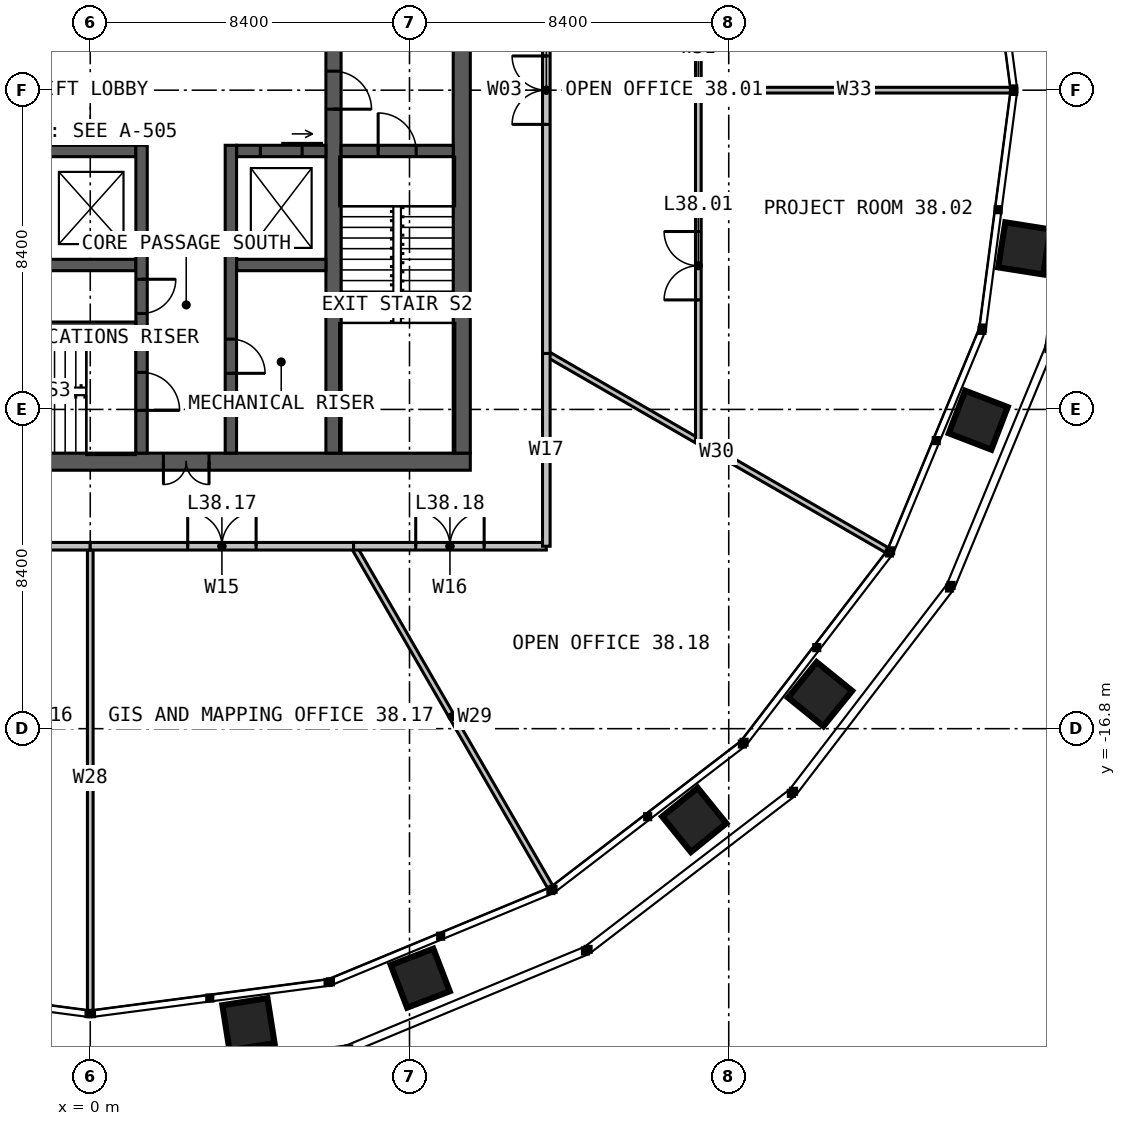
"""IFC4 building model, lengths in metres.
Left out: names, types, materials, properties, quantities, classifications, styles, units other than length and angle.
Written with IfcOpenShell. Run it as: python <this file> out.ifc"""

import sys

from ifc_helpers import new_model, si_unit, direction, frame, frame_2d, origin, place, context, subcontext, project, spatial, rectangle, extrude, element, fill, save


model = new_model("IFC4")
c1 = context("Model", 3, precision=1e-05, world=origin(), true_north=direction((0.0, 1.0)))
c2 = subcontext(c1, "Body", "Model", "MODEL_VIEW")
j1 = project(units=[si_unit("LENGTHUNIT", "METRE"), si_unit("PLANEANGLEUNIT", "RADIAN")], contexts=[c1])
p1 = place(None, origin())
s1 = spatial("IfcSite", under=j1, at=p1, CompositionType="ELEMENT")
p2 = place(p1, origin())
s2 = spatial("IfcBuilding", under=s1, at=p2, CompositionType="ELEMENT")
p3 = place(p2, frame((0.0, 0.0, 159.0)))
s3 = spatial("IfcBuildingStorey", under=s2, at=p3, CompositionType="ELEMENT", Elevation=159.0)
p4 = place(p3, frame((10.0, -9.775, 0.0), z_axis=(0.0, 0.0, 1.0), x_axis=(-1.0, 0.0, 0.0)))
e1 = element("IfcWall", 1, at=p4, inside=s3, PredefinedType="SOLIDWALL", context=c2, shape_type="SweptSolid", body=[
    extrude(rectangle(XDim=20.0, YDim=0.45, at=frame_2d((10.0, 0.0))), origin(), (0.0, 0.0, 1.0), 4.0),
])
p5 = place(p4, frame((6.875, 0.0, 0.0)))
e2 = element("IfcOpeningElement", 2, at=p5, cuts=e1, PredefinedType="OPENING", context=c2, shape_type="SweptSolid", body=[
    extrude(rectangle(XDim=1.2, YDim=2.2, at=frame_2d((0.6, 1.1))), frame((0.0, 0.235, 0.0), z_axis=(0.0, -1.0, 0.0), x_axis=(1.0, 0.0, 0.0)), (0.0, 0.0, 1.0), 0.47),
])
p6 = place(p3, frame((9.775, -9.55, 0.0), z_axis=(0.0, 0.0, 1.0), x_axis=(0.0, 1.0, 0.0)))
e3 = element("IfcWall", 3, at=p6, inside=s3, PredefinedType="SOLIDWALL", context=c2, shape_type="SweptSolid", body=[
    extrude(rectangle(XDim=19.1, YDim=0.45, at=frame_2d((9.55, 0.0))), origin(), (0.0, 0.0, 1.0), 4.0),
])
p7 = place(p3, frame((6.4, 9.55, 0.0), z_axis=(0.0, 0.0, 1.0), x_axis=(0.0, -1.0, 0.0)))
e4 = element("IfcWall", 4, at=p7, inside=s3, PredefinedType="SOLIDWALL", context=c2, shape_type="SweptSolid", body=[
    extrude(rectangle(XDim=19.1, YDim=0.4, at=frame_2d((9.55, 0.0))), origin(), (0.0, 0.0, 1.0), 4.0),
])
p8 = place(p7, frame((9.05, 0.0, 0.0)))
e5 = element("IfcOpeningElement", 5, at=p8, cuts=e4, PredefinedType="OPENING", context=c2, shape_type="SweptSolid", body=[
    extrude(rectangle(XDim=1.0, YDim=2.2, at=frame_2d((0.5, 1.1))), frame((0.0, 0.21, 0.0), z_axis=(0.0, -1.0, 0.0), x_axis=(1.0, 0.0, 0.0)), (0.0, 0.0, 1.0), 0.42),
])
p9 = place(p3, frame((-6.2, -1.6, 0.0), z_axis=(0.0, 0.0, 1.0), x_axis=(1.0, 0.0, 0.0)))
e6 = element("IfcWall", 6, at=p9, inside=s3, PredefinedType="SOLIDWALL", context=c2, shape_type="SweptSolid", body=[
    extrude(rectangle(XDim=7.4, YDim=0.3, at=frame_2d((3.7, 0.0))), origin(), (0.0, 0.0, 1.0), 4.0),
])
p10 = place(p3, frame((3.85, -1.6, 0.0), z_axis=(0.0, 0.0, 1.0), x_axis=(1.0, 0.0, 0.0)))
e7 = element("IfcWall", 7, at=p10, inside=s3, PredefinedType="SOLIDWALL", context=c2, shape_type="SweptSolid", body=[
    extrude(rectangle(XDim=2.35, YDim=0.3, at=frame_2d((1.175, 0.0))), origin(), (0.0, 0.0, 1.0), 4.0),
])
p11 = place(p10, frame((0.625, 0.0, 0.0)))
e8 = element("IfcOpeningElement", 8, at=p11, cuts=e7, PredefinedType="OPENING", context=c2, shape_type="SweptSolid", body=[
    extrude(rectangle(XDim=1.1, YDim=2.2, at=frame_2d((0.55, 1.1))), frame((0.0, 0.16, 0.0), z_axis=(0.0, -1.0, 0.0), x_axis=(1.0, 0.0, 0.0)), (0.0, 0.0, 1.0), 0.32),
])
p12 = place(p3, frame((-6.2, -4.6, 0.0), z_axis=(0.0, 0.0, 1.0), x_axis=(1.0, 0.0, 0.0)))
e9 = element("IfcWall", 9, at=p12, inside=s3, PredefinedType="SOLIDWALL", context=c2, shape_type="SweptSolid", body=[
    extrude(rectangle(XDim=7.4, YDim=0.3, at=frame_2d((3.7, 0.0))), origin(), (0.0, 0.0, 1.0), 4.0),
])
p13 = place(p3, frame((3.85, -4.6, 0.0), z_axis=(0.0, 0.0, 1.0), x_axis=(1.0, 0.0, 0.0)))
e10 = element("IfcWall", 10, at=p13, inside=s3, PredefinedType="SOLIDWALL", context=c2, shape_type="SweptSolid", body=[
    extrude(rectangle(XDim=2.35, YDim=0.3, at=frame_2d((1.175, 0.0))), origin(), (0.0, 0.0, 1.0), 4.0),
])
p14 = place(p3, frame((1.35, -1.45, 0.0), z_axis=(0.0, 0.0, 1.0), x_axis=(0.0, -1.0, 0.0)))
e11 = element("IfcWall", 11, at=p14, inside=s3, PredefinedType="SOLIDWALL", context=c2, shape_type="SweptSolid", body=[
    extrude(rectangle(XDim=8.1, YDim=0.3, at=frame_2d((4.05, 0.0))), origin(), (0.0, 0.0, 1.0), 4.0),
])
p15 = place(p14, frame((5.975, 0.0, 0.0)))
e12 = element("IfcOpeningElement", 12, at=p15, cuts=e11, PredefinedType="OPENING", context=c2, shape_type="SweptSolid", body=[
    extrude(rectangle(XDim=1.0, YDim=2.2, at=frame_2d((0.5, 1.1))), frame((0.0, 0.16, 0.0), z_axis=(0.0, -1.0, 0.0), x_axis=(1.0, 0.0, 0.0)), (0.0, 0.0, 1.0), 0.32),
])
p16 = place(p14, frame((3.525, 0.0, 0.0)))
e13 = element("IfcOpeningElement", 13, at=p16, cuts=e11, PredefinedType="OPENING", context=c2, shape_type="SweptSolid", body=[
    extrude(rectangle(XDim=0.9, YDim=2.2, at=frame_2d((0.45, 1.1))), frame((0.0, 0.16, 0.0), z_axis=(0.0, -1.0, 0.0), x_axis=(1.0, 0.0, 0.0)), (0.0, 0.0, 1.0), 0.32),
])
p17 = place(p3, frame((3.7, -1.45, 0.0), z_axis=(0.0, 0.0, 1.0), x_axis=(0.0, -1.0, 0.0)))
e14 = element("IfcWall", 14, at=p17, inside=s3, PredefinedType="SOLIDWALL", context=c2, shape_type="SweptSolid", body=[
    extrude(rectangle(XDim=8.1, YDim=0.3, at=frame_2d((4.05, 0.0))), origin(), (0.0, 0.0, 1.0), 4.0),
])
p18 = place(p17, frame((5.1, 0.0, 0.0)))
e15 = element("IfcOpeningElement", 15, at=p18, cuts=e14, PredefinedType="OPENING", context=c2, shape_type="SweptSolid", body=[
    extrude(rectangle(XDim=0.9, YDim=2.2, at=frame_2d((0.45, 1.1))), frame((0.0, 0.16, 0.0), z_axis=(0.0, -1.0, 0.0), x_axis=(1.0, 0.0, 0.0)), (0.0, 0.0, 1.0), 0.32),
])
p19 = place(p3, frame((-6.2, -6.2, 0.0), z_axis=(0.0, 0.0, 1.0), x_axis=(1.0, 0.0, 0.0)))
e16 = element("IfcWall", 16, at=p19, inside=s3, PredefinedType="SOLIDWALL", context=c2, shape_type="SweptSolid", body=[
    extrude(rectangle(XDim=7.4, YDim=0.2, at=frame_2d((3.7, 0.0))), origin(), (0.0, 0.0, 1.0), 4.0),
])
p20 = place(p3, frame((6.6, -1.6, 0.0), z_axis=(0.0, 0.0, 1.0), x_axis=(1.0, 0.0, 0.0)))
e17 = element("IfcWall", 17, at=p20, inside=s3, PredefinedType="SOLIDWALL", context=c2, shape_type="SweptSolid", body=[
    extrude(rectangle(XDim=2.95, YDim=0.3, at=frame_2d((1.475, 0.0))), origin(), (0.0, 0.0, 1.0), 4.0),
])
p21 = place(p20, frame((0.975, 0.0, 0.0)))
e18 = element("IfcOpeningElement", 18, at=p21, cuts=e17, PredefinedType="OPENING", context=c2, shape_type="SweptSolid", body=[
    extrude(rectangle(XDim=1.0, YDim=2.2, at=frame_2d((0.5, 1.1))), frame((0.0, 0.16, 0.0), z_axis=(0.0, -1.0, 0.0), x_axis=(1.0, 0.0, 0.0)), (0.0, 0.0, 1.0), 0.32),
])
p22 = place(p3, frame((12.0, -6.928, 0.0), z_axis=(0.0, 0.0, 1.0), x_axis=(0.86602185845, -0.500006140648, 0.0)))
e19 = element("IfcWall", 19, at=p22, inside=s3, PredefinedType="PARTITIONING", context=c2, shape_type="SweptSolid", body=[
    extrude(rectangle(XDim=10.355, YDim=0.15, at=frame_2d((5.177, 0.0))), origin(), (0.0, 0.0, 1.0), 2.79),
])
p23 = place(p3, frame((0.0, -12.0, 0.0), z_axis=(0.0, 0.0, 1.0), x_axis=(0.0, -1.0, 0.0)))
e20 = element("IfcWall", 20, at=p23, inside=s3, PredefinedType="PARTITIONING", context=c2, shape_type="SweptSolid", body=[
    extrude(rectangle(XDim=12.211, YDim=0.15, at=frame_2d((6.105, 0.0))), origin(), (0.0, 0.0, 1.0), 2.79),
])
p24 = place(p3, frame((6.928, -12.0, 0.0), z_axis=(0.0, 0.0, 1.0), x_axis=(0.500006140648, -0.86602185845, 0.0)))
e21 = element("IfcWall", 21, at=p24, inside=s3, PredefinedType="PARTITIONING", context=c2, shape_type="SweptSolid", body=[
    extrude(rectangle(XDim=10.355, YDim=0.15, at=frame_2d((5.177, 0.0))), origin(), (0.0, 0.0, 1.0), 2.79),
])
p25 = place(p3, frame((16.0, -9.238, 0.0), z_axis=(0.0, 0.0, 1.0), x_axis=(0.0, 1.0, 0.0)))
e22 = element("IfcWall", 22, at=p25, inside=s3, PredefinedType="PARTITIONING", context=c2, shape_type="SweptSolid", body=[
    extrude(rectangle(XDim=18.475, YDim=0.15, at=frame_2d((9.238, 0.0))), origin(), (0.0, 0.0, 1.0), 2.79),
])
p26 = place(p25, frame((3.719, 0.0, 0.0)))
e23 = element("IfcOpeningElement", 23, at=p26, cuts=e22, PredefinedType="OPENING", context=c2, shape_type="SweptSolid", body=[
    extrude(rectangle(XDim=1.8, YDim=2.2, at=frame_2d((0.9, 1.1))), frame((0.0, 0.085, 0.0), z_axis=(0.0, -1.0, 0.0), x_axis=(1.0, 0.0, 0.0)), (0.0, 0.0, 1.0), 0.17),
])
p27 = place(p25, frame((12.956, 0.0, 0.0)))
e24 = element("IfcOpeningElement", 24, at=p27, cuts=e22, PredefinedType="OPENING", context=c2, shape_type="SweptSolid", body=[
    extrude(rectangle(XDim=1.8, YDim=2.2, at=frame_2d((0.9, 1.1))), frame((0.0, 0.085, 0.0), z_axis=(0.0, -1.0, 0.0), x_axis=(1.0, 0.0, 0.0)), (0.0, 0.0, 1.0), 0.17),
])
p28 = place(p3, frame((16.0, 0.0, 0.0), z_axis=(0.0, 0.0, 1.0), x_axis=(1.0, 0.0, 0.0)))
e25 = element("IfcWall", 25, at=p28, inside=s3, PredefinedType="PARTITIONING", context=c2, shape_type="SweptSolid", body=[
    extrude(rectangle(XDim=8.211, YDim=0.15, at=frame_2d((4.105, 0.0))), origin(), (0.0, 0.0, 1.0), 2.79),
])
p29 = place(p3, frame((12.0, -6.928, 0.0), z_axis=(0.0, 0.0, 1.0), x_axis=(0.0, 1.0, 0.0)))
e26 = element("IfcWall", 26, at=p29, inside=s3, PredefinedType="PARTITIONING", context=c2, shape_type="SweptSolid", body=[
    extrude(rectangle(XDim=13.856, YDim=0.2, at=frame_2d((6.928, 0.0))), origin(), (0.0, 0.0, 1.0), 3.8),
])
p30 = place(p29, frame((6.028, 0.0, 0.0)))
e27 = element("IfcOpeningElement", 27, at=p30, cuts=e26, PredefinedType="OPENING", context=c2, shape_type="SweptSolid", body=[
    extrude(rectangle(XDim=1.8, YDim=2.2, at=frame_2d((0.9, 1.1))), frame((0.0, 0.11, 0.0), z_axis=(0.0, -1.0, 0.0), x_axis=(1.0, 0.0, 0.0)), (0.0, 0.0, 1.0), 0.22),
])
p31 = place(p3, frame((-6.928, -12.0, 0.0), z_axis=(0.0, 0.0, 1.0), x_axis=(1.0, 0.0, 0.0)))
e28 = element("IfcWall", 28, at=p31, inside=s3, PredefinedType="PARTITIONING", context=c2, shape_type="SweptSolid", body=[
    extrude(rectangle(XDim=6.928, YDim=0.2, at=frame_2d((3.464, 0.0))), origin(), (0.0, 0.0, 1.0), 3.8),
])
p32 = place(p31, frame((2.564, 0.0, 0.0)))
e29 = element("IfcOpeningElement", 29, at=p32, cuts=e28, PredefinedType="OPENING", context=c2, shape_type="SweptSolid", body=[
    extrude(rectangle(XDim=1.8, YDim=2.2, at=frame_2d((0.9, 1.1))), frame((0.0, 0.11, 0.0), z_axis=(0.0, -1.0, 0.0), x_axis=(1.0, 0.0, 0.0)), (0.0, 0.0, 1.0), 0.22),
])
p33 = place(p3, frame((0.0, -12.0, 0.0), z_axis=(0.0, 0.0, 1.0), x_axis=(1.0, 0.0, 0.0)))
e30 = element("IfcWall", 30, at=p33, inside=s3, PredefinedType="PARTITIONING", context=c2, shape_type="SweptSolid", body=[
    extrude(rectangle(XDim=6.928, YDim=0.2, at=frame_2d((3.464, 0.0))), origin(), (0.0, 0.0, 1.0), 3.8),
])
p34 = place(p33, frame((2.564, 0.0, 0.0)))
e31 = element("IfcOpeningElement", 31, at=p34, cuts=e30, PredefinedType="OPENING", context=c2, shape_type="SweptSolid", body=[
    extrude(rectangle(XDim=1.8, YDim=2.2, at=frame_2d((0.9, 1.1))), frame((0.0, 0.11, 0.0), z_axis=(0.0, -1.0, 0.0), x_axis=(1.0, 0.0, 0.0)), (0.0, 0.0, 1.0), 0.22),
])
p35 = place(p3, frame((6.928, -12.0, 0.0), z_axis=(0.0, 0.0, 1.0), x_axis=(1.0, 0.0, 0.0)))
e32 = element("IfcWall", 32, at=p35, inside=s3, PredefinedType="PARTITIONING", context=c2, shape_type="SweptSolid", body=[
    extrude(rectangle(XDim=5.072, YDim=0.2, at=frame_2d((2.536, 0.0))), origin(), (0.0, 0.0, 1.0), 3.8),
])
p36 = place(p35, frame((1.636, 0.0, 0.0)))
e33 = element("IfcOpeningElement", 33, at=p36, cuts=e32, PredefinedType="OPENING", context=c2, shape_type="SweptSolid", body=[
    extrude(rectangle(XDim=1.8, YDim=2.2, at=frame_2d((0.9, 1.1))), frame((0.0, 0.11, 0.0), z_axis=(0.0, -1.0, 0.0), x_axis=(1.0, 0.0, 0.0)), (0.0, 0.0, 1.0), 0.22),
])
p37 = place(p3, frame((12.0, -12.0, 0.0), z_axis=(0.0, 0.0, 1.0), x_axis=(0.0, 1.0, 0.0)))
e34 = element("IfcWall", 34, at=p37, inside=s3, PredefinedType="PARTITIONING", context=c2, shape_type="SweptSolid", body=[
    extrude(rectangle(XDim=5.072, YDim=0.2, at=frame_2d((2.536, 0.0))), origin(), (0.0, 0.0, 1.0), 3.8),
])
p38 = place(p5, origin())
e35 = element("IfcDoor", 35, at=p38, inside=s3, OperationType="DOUBLE_DOOR_SINGLE_SWING", PredefinedType="DOOR", context=c2, shape_type="SweptSolid", body=[
    extrude(rectangle(XDim=1.2, YDim=2.2, at=frame_2d((0.6, 1.1))), frame((0.0, 0.025, 0.0), z_axis=(0.0, -1.0, 0.0), x_axis=(1.0, 0.0, 0.0)), (0.0, 0.0, 1.0), 0.05),
])
fill(e2, e35)
p39 = place(p8, origin())
e36 = element("IfcDoor", 36, at=p39, inside=s3, OperationType="SINGLE_SWING_RIGHT", PredefinedType="DOOR", context=c2, shape_type="SweptSolid", body=[
    extrude(rectangle(XDim=1.0, YDim=2.2, at=frame_2d((0.5, 1.1))), frame((0.0, 0.025, 0.0), z_axis=(0.0, -1.0, 0.0), x_axis=(1.0, 0.0, 0.0)), (0.0, 0.0, 1.0), 0.05),
])
fill(e5, e36)
p40 = place(p21, origin())
e37 = element("IfcDoor", 37, at=p40, inside=s3, OperationType="SINGLE_SWING_LEFT", PredefinedType="DOOR", context=c2, shape_type="SweptSolid", body=[
    extrude(rectangle(XDim=1.0, YDim=2.2, at=frame_2d((0.5, 1.1))), frame((0.0, 0.025, 0.0), z_axis=(0.0, -1.0, 0.0), x_axis=(1.0, 0.0, 0.0)), (0.0, 0.0, 1.0), 0.05),
])
fill(e18, e37)
p41 = place(p15, origin())
e38 = element("IfcDoor", 38, at=p41, inside=s3, OperationType="SINGLE_SWING_RIGHT", PredefinedType="DOOR", context=c2, shape_type="SweptSolid", body=[
    extrude(rectangle(XDim=1.0, YDim=2.2, at=frame_2d((0.5, 1.1))), frame((0.0, 0.025, 0.0), z_axis=(0.0, -1.0, 0.0), x_axis=(1.0, 0.0, 0.0)), (0.0, 0.0, 1.0), 0.05),
])
fill(e12, e38)
p42 = place(p16, origin())
e39 = element("IfcDoor", 39, at=p42, inside=s3, OperationType="SINGLE_SWING_LEFT", PredefinedType="DOOR", context=c2, shape_type="SweptSolid", body=[
    extrude(rectangle(XDim=0.9, YDim=2.2, at=frame_2d((0.45, 1.1))), frame((0.0, 0.025, 0.0), z_axis=(0.0, -1.0, 0.0), x_axis=(1.0, 0.0, 0.0)), (0.0, 0.0, 1.0), 0.05),
])
fill(e13, e39)
p43 = place(p18, origin())
e40 = element("IfcDoor", 40, at=p43, inside=s3, OperationType="SINGLE_SWING_RIGHT", PredefinedType="DOOR", context=c2, shape_type="SweptSolid", body=[
    extrude(rectangle(XDim=0.9, YDim=2.2, at=frame_2d((0.45, 1.1))), frame((0.0, 0.025, 0.0), z_axis=(0.0, -1.0, 0.0), x_axis=(1.0, 0.0, 0.0)), (0.0, 0.0, 1.0), 0.05),
])
fill(e15, e40)
p44 = place(p11, origin())
e41 = element("IfcDoor", 41, at=p44, inside=s3, OperationType="SLIDING_TO_LEFT", PredefinedType="DOOR", context=c2, shape_type="SweptSolid", body=[
    extrude(rectangle(XDim=1.1, YDim=2.2, at=frame_2d((0.55, 1.1))), frame((0.0, 0.025, 0.0), z_axis=(0.0, -1.0, 0.0), x_axis=(1.0, 0.0, 0.0)), (0.0, 0.0, 1.0), 0.05),
])
fill(e8, e41)
p45 = place(p26, origin())
e42 = element("IfcDoor", 42, at=p45, inside=s3, OperationType="DOUBLE_DOOR_SINGLE_SWING", PredefinedType="DOOR", context=c2, shape_type="SweptSolid", body=[
    extrude(rectangle(XDim=1.8, YDim=2.2, at=frame_2d((0.9, 1.1))), frame((0.0, 0.025, 0.0), z_axis=(0.0, -1.0, 0.0), x_axis=(1.0, 0.0, 0.0)), (0.0, 0.0, 1.0), 0.05),
])
fill(e23, e42)
p46 = place(p30, origin())
e43 = element("IfcDoor", 43, at=p46, inside=s3, OperationType="DOUBLE_DOOR_SINGLE_SWING", PredefinedType="DOOR", context=c2, shape_type="SweptSolid", body=[
    extrude(rectangle(XDim=1.8, YDim=2.2, at=frame_2d((0.9, 1.1))), frame((0.0, 0.025, 0.0), z_axis=(0.0, -1.0, 0.0), x_axis=(1.0, 0.0, 0.0)), (0.0, 0.0, 1.0), 0.05),
])
fill(e27, e43)
p47 = place(p34, origin())
e44 = element("IfcDoor", 44, at=p47, inside=s3, OperationType="DOUBLE_DOOR_SINGLE_SWING", PredefinedType="DOOR", context=c2, shape_type="SweptSolid", body=[
    extrude(rectangle(XDim=1.8, YDim=2.2, at=frame_2d((0.9, 1.1))), frame((0.0, 0.025, 0.0), z_axis=(0.0, -1.0, 0.0), x_axis=(1.0, 0.0, 0.0)), (0.0, 0.0, 1.0), 0.05),
])
fill(e31, e44)
p48 = place(p36, origin())
e45 = element("IfcDoor", 45, at=p48, inside=s3, OperationType="DOUBLE_DOOR_SINGLE_SWING", PredefinedType="DOOR", context=c2, shape_type="SweptSolid", body=[
    extrude(rectangle(XDim=1.8, YDim=2.2, at=frame_2d((0.9, 1.1))), frame((0.0, 0.025, 0.0), z_axis=(0.0, -1.0, 0.0), x_axis=(1.0, 0.0, 0.0)), (0.0, 0.0, 1.0), 0.05),
])
fill(e33, e45)
save(model, sys.argv[1])
